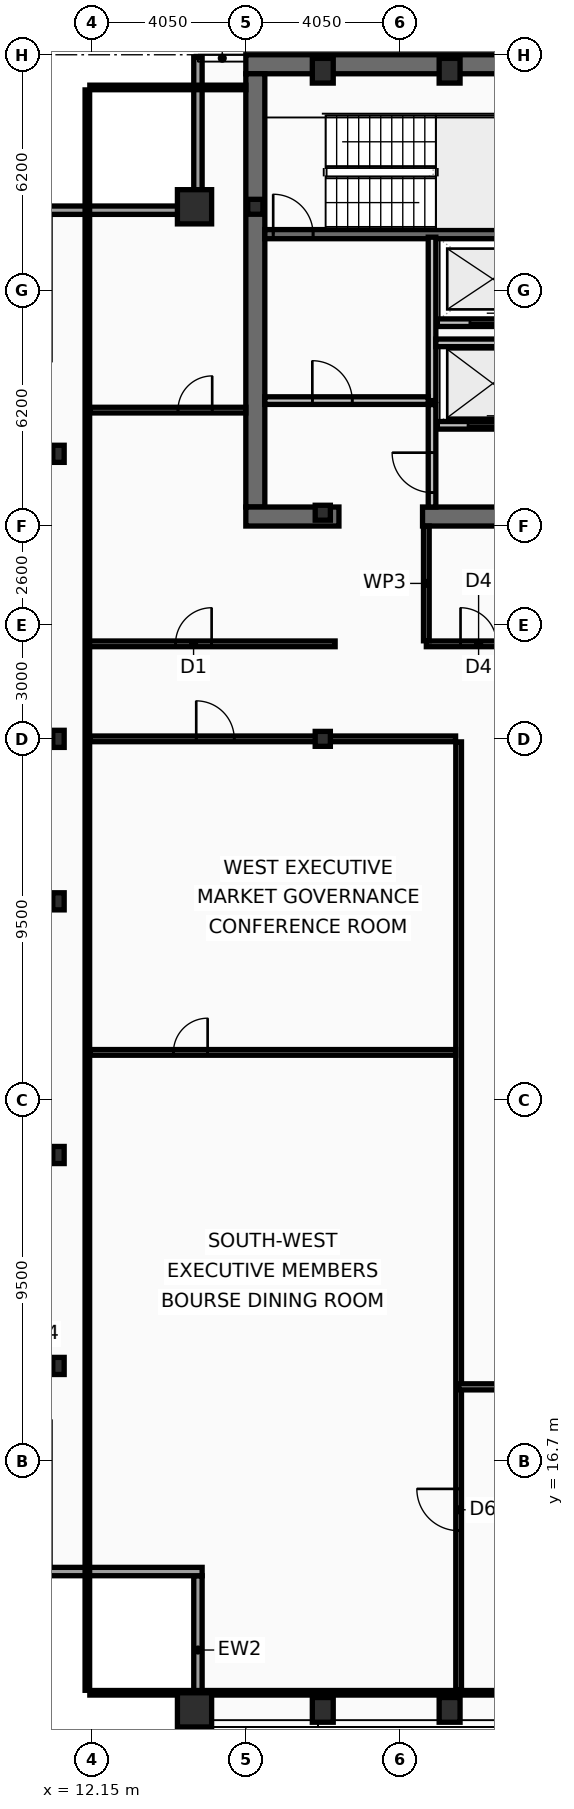
"""IFC4 building model, lengths in metres.
Left out: names, types, materials, properties, quantities, classifications, styles, units other than length and angle.
Written with IfcOpenShell. Run it as: python <this file> out.ifc"""

import sys

from ifc_helpers import new_model, si_unit, direction, frame, frame_2d, origin, origin_2d, place, context, subcontext, project, spatial, rectangle, hollow_rectangle, i_section, extrude, element, fill, save


model = new_model("IFC4")
c1 = context("Model", 3, precision=1e-05, world=origin(), true_north=direction((0.0, 1.0)))
c2 = subcontext(c1, "Body", "Model", "MODEL_VIEW")
j1 = project(units=[si_unit("LENGTHUNIT", "METRE"), si_unit("PLANEANGLEUNIT", "RADIAN")], contexts=[c1])
p1 = place(None, origin())
s1 = spatial("IfcSite", under=j1, at=p1, CompositionType="ELEMENT")
p2 = place(p1, origin())
s2 = spatial("IfcBuilding", under=s1, at=p2, CompositionType="ELEMENT")
p3 = place(p2, frame((0.0, 0.0, 298.6)))
s3 = spatial("IfcBuildingStorey", under=s2, at=p3, CompositionType="ELEMENT", Elevation=298.6)
p4 = place(p3, frame((16.2, 53.45, 0.0), z_axis=(0.0, 0.0, 1.0), x_axis=(1.0, 0.0, 0.0)))
e1 = element("IfcWall", 1, at=p4, inside=s3, PredefinedType="SHEAR", context=c2, shape_type="SweptSolid", body=[
    extrude(rectangle(XDim=40.5, YDim=0.5, at=frame_2d((20.25, 0.0))), origin(), (0.0, 0.0, 1.0), 3.44),
])
p5 = place(p3, frame((16.45, 41.8, 0.0), z_axis=(0.0, 0.0, 1.0), x_axis=(0.0, 1.0, 0.0)))
e2 = element("IfcWall", 2, at=p5, inside=s3, PredefinedType="SHEAR", context=c2, shape_type="SweptSolid", body=[
    extrude(rectangle(XDim=11.4, YDim=0.5, at=frame_2d((5.7, 0.0))), origin(), (0.0, 0.0, 1.0), 3.44),
])
p6 = place(p3, frame((18.65, 41.55, 0.0), z_axis=(0.0, 0.0, 1.0), x_axis=(-1.0, 0.0, 0.0)))
e3 = element("IfcWall", 3, at=p6, inside=s3, PredefinedType="SHEAR", context=c2, shape_type="SweptSolid", body=[
    extrude(rectangle(XDim=2.45, YDim=0.5, at=frame_2d((1.225, 0.0))), origin(), (0.0, 0.0, 1.0), 3.44),
])
p7 = place(p3, frame((32.3, 41.55, 0.0), z_axis=(0.0, 0.0, 1.0), x_axis=(-1.0, 0.0, 0.0)))
e4 = element("IfcWall", 4, at=p7, inside=s3, PredefinedType="SHEAR", context=c2, shape_type="SweptSolid", body=[
    extrude(rectangle(XDim=11.45, YDim=0.5, at=frame_2d((5.725, 0.0))), origin(), (0.0, 0.0, 1.0), 3.44),
])
p8 = place(p3, frame((16.7, 48.98, 0.0), z_axis=(0.0, 0.0, 1.0), x_axis=(1.0, 0.0, 0.0)))
e5 = element("IfcWall", 5, at=p8, inside=s3, PredefinedType="SHEAR", context=c2, shape_type="SweptSolid", body=[
    extrude(rectangle(XDim=7.52, YDim=0.24, at=frame_2d((3.76, 0.0))), origin(), (0.0, 0.0, 1.0), 3.44),
])
p9 = place(p8, frame((0.22, 0.0, 0.0)))
e6 = element("IfcOpeningElement", 6, at=p9, cuts=e5, PredefinedType="OPENING", context=c2, shape_type="SweptSolid", body=[
    extrude(rectangle(XDim=1.05, YDim=2.15, at=frame_2d((0.525, 1.075))), frame((0.0, 0.13, 0.0), z_axis=(0.0, -1.0, 0.0), x_axis=(1.0, 0.0, 0.0)), (0.0, 0.0, 1.0), 0.26),
])
for number, where, z_axis, x_axis in (
    (7, (14.85, 10.15, 0.0), (0.0, 0.0, 1.0), (1.0, 0.0, 0.0)),
    (8, (14.85, 49.7, 0.0), (0.0, 0.0, 1.0), (1.0, 0.0, 0.0)),
):
    element("IfcColumn", number, at=place(p3, frame(where, z_axis=z_axis, x_axis=x_axis)), inside=s3, PredefinedType="COLUMN", context=c2, shape_type="SweptSolid", body=[
        extrude(hollow_rectangle(XDim=0.9, YDim=0.9, WallThickness=0.05, at=origin_2d()), origin(), (0.0, 0.0, 1.0), 3.6),
    ])
for number, where, z_axis, x_axis in (
    (9, (18.225, 10.15, 0.0), (0.0, 0.0, 1.0), (1.0, 0.0, 0.0)),
    (10, (21.562, 10.15, 0.0), (0.0, 0.0, 1.0), (1.0, 0.0, 0.0)),
    (11, (18.225, 53.28, 0.0), (0.0, 0.0, 1.0), (1.0, 0.0, 0.0)),
    (12, (21.562, 53.28, 0.0), (0.0, 0.0, 1.0), (1.0, 0.0, 0.0)),
):
    element("IfcColumn", number, at=place(p3, frame(where, z_axis=z_axis, x_axis=x_axis)), inside=s3, PredefinedType="COLUMN", context=c2, shape_type="SweptSolid", body=[
        extrude(hollow_rectangle(XDim=0.55, YDim=0.65, WallThickness=0.04, at=origin_2d()), origin(), (0.0, 0.0, 1.0), 3.6),
    ])
for number, where, z_axis, x_axis in (
    (13, (11.27, 19.2, 0.0), (0.0, 0.0, 1.0), (1.0, 0.0, 0.0)),
    (14, (11.27, 24.75, 0.0), (0.0, 0.0, 1.0), (1.0, 0.0, 0.0)),
    (15, (11.27, 31.425, 0.0), (0.0, 0.0, 1.0), (1.0, 0.0, 0.0)),
    (16, (11.27, 35.7, 0.0), (0.0, 0.0, 1.0), (1.0, 0.0, 0.0)),
    (17, (11.27, 43.2, 0.0), (0.0, 0.0, 1.0), (1.0, 0.0, 0.0)),
):
    element("IfcColumn", number, at=place(p3, frame(where, z_axis=z_axis, x_axis=x_axis)), inside=s3, PredefinedType="COLUMN", context=c2, shape_type="SweptSolid", body=[
        extrude(i_section(OverallWidth=0.3, OverallDepth=0.45, WebThickness=0.014, FlangeThickness=0.026, at=origin_2d()), origin(), (0.0, 0.0, 1.0), 3.6),
    ])
for number, where, z_axis, x_axis in (
    (18, (16.45, 49.7, 0.0), (0.0, 0.0, 1.0), (1.0, 0.0, 0.0)),
    (19, (18.225, 35.7, 0.0), (0.0, 0.0, 1.0), (1.0, 0.0, 0.0)),
    (20, (18.225, 41.65, 0.0), (0.0, 0.0, 1.0), (1.0, 0.0, 0.0)),
):
    element("IfcColumn", number, at=place(p3, frame(where, z_axis=z_axis, x_axis=x_axis)), inside=s3, PredefinedType="COLUMN", context=c2, shape_type="SweptSolid", body=[
        extrude(i_section(OverallWidth=0.399, OverallDepth=0.393, WebThickness=0.023, FlangeThickness=0.037, at=origin_2d()), origin(), (0.0, 0.0, 1.0), 3.6),
    ])
p10 = place(p3, frame((14.94, 9.77, 0.0), z_axis=(0.0, 0.0, 1.0), x_axis=(0.0, 1.0, 0.0)))
e21 = element("IfcWall", 21, at=p10, inside=s3, PredefinedType="SOLIDWALL", context=c2, shape_type="SweptSolid", body=[
    extrude(rectangle(XDim=3.91, YDim=0.22, at=frame_2d((1.955, 0.0))), origin(), (0.0, 0.0, 1.0), 2.88),
])
for number, where, z_axis, x_axis in (
    (22, (15.05, 13.79, 0.0), (0.0, 0.0, 1.0), (-1.0, 0.0, 0.0)),
    (23, (10.83, 49.61, 0.0), (0.0, 0.0, 1.0), (1.0, 0.0, 0.0)),
):
    element("IfcWall", number, at=place(p3, frame(where, z_axis=z_axis, x_axis=x_axis)), inside=s3, PredefinedType="SOLIDWALL", context=c2, shape_type="SweptSolid", body=[
        extrude(rectangle(XDim=4.22, YDim=0.22, at=frame_2d((2.11, 0.0))), origin(), (0.0, 0.0, 1.0), 2.88),
    ])
p11 = place(p3, frame((14.94, 49.72, 0.0), z_axis=(0.0, 0.0, 1.0), x_axis=(0.0, 1.0, 0.0)))
e24 = element("IfcWall", 24, at=p11, inside=s3, PredefinedType="SOLIDWALL", context=c2, shape_type="SweptSolid", body=[
    extrude(rectangle(XDim=3.91, YDim=0.22, at=frame_2d((1.955, 0.0))), origin(), (0.0, 0.0, 1.0), 2.88),
])
p12 = place(p3, frame((24.21, 43.95, 0.0), z_axis=(0.0, 0.0, 1.0), x_axis=(-1.0, 0.0, 0.0)))
e25 = element("IfcWall", 25, at=p12, inside=s3, PredefinedType="PARTITIONING", context=c2, shape_type="SweptSolid", body=[
    extrude(rectangle(XDim=2.97, YDim=0.2, at=frame_2d((1.485, 0.0))), origin(), (0.0, 0.0, 1.0), 3.44),
])
p13 = place(p12, frame((0.86, 0.0, 0.0)))
e26 = element("IfcOpeningElement", 26, at=p13, cuts=e25, PredefinedType="OPENING", context=c2, shape_type="SweptSolid", body=[
    extrude(rectangle(XDim=1.3, YDim=2.18, at=frame_2d((0.65, 1.09))), frame((0.0, 0.11, 0.0), z_axis=(0.0, -1.0, 0.0), x_axis=(1.0, 0.0, 0.0)), (0.0, 0.0, 1.0), 0.22),
])
p14 = place(p3, frame((24.21, 46.65, 0.0), z_axis=(0.0, 0.0, 1.0), x_axis=(-1.0, 0.0, 0.0)))
e27 = element("IfcWall", 27, at=p14, inside=s3, PredefinedType="PARTITIONING", context=c2, shape_type="SweptSolid", body=[
    extrude(rectangle(XDim=2.97, YDim=0.2, at=frame_2d((1.485, 0.0))), origin(), (0.0, 0.0, 1.0), 3.44),
])
p15 = place(p14, frame((0.91, 0.0, 0.0)))
e28 = element("IfcOpeningElement", 28, at=p15, cuts=e27, PredefinedType="OPENING", context=c2, shape_type="SweptSolid", body=[
    extrude(rectangle(XDim=1.2, YDim=2.18, at=frame_2d((0.6, 1.09))), frame((0.0, 0.11, 0.0), z_axis=(0.0, -1.0, 0.0), x_axis=(1.0, 0.0, 0.0)), (0.0, 0.0, 1.0), 0.22),
])
p16 = place(p3, frame((21.1, 44.6, 0.0), z_axis=(0.0, 0.0, 1.0), x_axis=(0.0, 1.0, 0.0)))
e29 = element("IfcWall", 29, at=p16, inside=s3, PredefinedType="PARTITIONING", context=c2, shape_type="SweptSolid", body=[
    extrude(rectangle(XDim=4.3, YDim=0.2, at=frame_2d((2.15, 0.0))), origin(), (0.0, 0.0, 1.0), 3.44),
])
p17 = place(p3, frame((16.7, 44.6, 0.0), z_axis=(0.0, 0.0, 1.0), x_axis=(1.0, 0.0, 0.0)))
e30 = element("IfcWall", 30, at=p17, inside=s3, PredefinedType="PARTITIONING", context=c2, shape_type="SweptSolid", body=[
    extrude(rectangle(XDim=4.3, YDim=0.2, at=frame_2d((2.15, 0.0))), origin(), (0.0, 0.0, 1.0), 3.44),
])
p18 = place(p17, frame((1.25, 0.0, 0.0)))
e31 = element("IfcOpeningElement", 31, at=p18, cuts=e30, PredefinedType="OPENING", context=c2, shape_type="SweptSolid", body=[
    extrude(rectangle(XDim=1.05, YDim=2.15, at=frame_2d((0.525, 1.075))), frame((0.0, 0.11, 0.0), z_axis=(0.0, -1.0, 0.0), x_axis=(1.0, 0.0, 0.0)), (0.0, 0.0, 1.0), 0.22),
])
p19 = place(p3, frame((21.2, 46.12, 0.0), z_axis=(0.0, 0.0, 1.0), x_axis=(1.0, 0.0, 0.0)))
e32 = element("IfcWall", 32, at=p19, inside=s3, PredefinedType="PARTITIONING", context=c2, shape_type="SweptSolid", body=[
    extrude(rectangle(XDim=3.02, YDim=0.2, at=frame_2d((1.51, 0.0))), origin(), (0.0, 0.0, 1.0), 3.44),
])
p20 = place(p3, frame((21.1, 41.8, 0.0), z_axis=(0.0, 0.0, 1.0), x_axis=(0.0, 1.0, 0.0)))
e33 = element("IfcWall", 33, at=p20, inside=s3, PredefinedType="PARTITIONING", context=c2, shape_type="SweptSolid", body=[
    extrude(rectangle(XDim=2.695, YDim=0.2, at=frame_2d((1.348, 0.0))), origin(), (0.0, 0.0, 1.0), 3.44),
])
p21 = place(p20, frame((0.38, 0.0, 0.0)))
e34 = element("IfcOpeningElement", 34, at=p21, cuts=e33, PredefinedType="OPENING", context=c2, shape_type="SweptSolid", body=[
    extrude(rectangle(XDim=1.05, YDim=2.15, at=frame_2d((0.525, 1.075))), frame((0.0, 0.11, 0.0), z_axis=(0.0, -1.0, 0.0), x_axis=(1.0, 0.0, 0.0)), (0.0, 0.0, 1.0), 0.22),
])
p22 = place(p3, frame((20.95, 38.2, 0.0), z_axis=(0.0, 0.0, 1.0), x_axis=(1.0, 0.0, 0.0)))
e35 = element("IfcWall", 35, at=p22, inside=s3, PredefinedType="PARTITIONING", context=c2, shape_type="SweptSolid", body=[
    extrude(rectangle(XDim=3.75, YDim=0.15, at=frame_2d((1.875, 0.0))), origin(), (0.0, 0.0, 1.0), 2.78),
])
p23 = place(p22, frame((0.9, 0.0, 0.0)))
e36 = element("IfcOpeningElement", 36, at=p23, cuts=e35, PredefinedType="OPENING", context=c2, shape_type="SweptSolid", body=[
    extrude(rectangle(XDim=0.95, YDim=2.05, at=frame_2d((0.475, 1.025))), frame((0.0, 0.085, 0.0), z_axis=(0.0, -1.0, 0.0), x_axis=(1.0, 0.0, 0.0)), (0.0, 0.0, 1.0), 0.17),
])
p24 = place(p3, frame((20.95, 38.28, 0.0), z_axis=(0.0, 0.0, 1.0), x_axis=(0.0, 1.0, 0.0)))
e37 = element("IfcWall", 37, at=p24, inside=s3, PredefinedType="PARTITIONING", context=c2, shape_type="SweptSolid", body=[
    extrude(rectangle(XDim=3.02, YDim=0.15, at=frame_2d((1.51, 0.0))), origin(), (0.0, 0.0, 1.0), 3.44),
])
p25 = place(p3, frame((12.03, 38.2, 0.0), z_axis=(0.0, 0.0, 1.0), x_axis=(1.0, 0.0, 0.0)))
e38 = element("IfcWall", 38, at=p25, inside=s3, PredefinedType="PARTITIONING", context=c2, shape_type="SweptSolid", body=[
    extrude(rectangle(XDim=6.52, YDim=0.15, at=frame_2d((3.26, 0.0))), origin(), (0.0, 0.0, 1.0), 2.78),
])
p26 = place(p25, frame((2.32, 0.0, 0.0)))
e39 = element("IfcOpeningElement", 39, at=p26, cuts=e38, PredefinedType="OPENING", context=c2, shape_type="SweptSolid", body=[
    extrude(rectangle(XDim=0.95, YDim=2.05, at=frame_2d((0.475, 1.025))), frame((0.0, 0.085, 0.0), z_axis=(0.0, -1.0, 0.0), x_axis=(1.0, 0.0, 0.0)), (0.0, 0.0, 1.0), 0.17),
])
p27 = place(p3, frame((12.095, 44.35, 0.0), z_axis=(0.0, 0.0, 1.0), x_axis=(1.0, 0.0, 0.0)))
e40 = element("IfcWall", 40, at=p27, inside=s3, PredefinedType="PARTITIONING", context=c2, shape_type="SweptSolid", body=[
    extrude(rectangle(XDim=4.105, YDim=0.15, at=frame_2d((2.052, 0.0))), origin(), (0.0, 0.0, 1.0), 2.88),
])
p28 = place(p27, frame((2.32, 0.0, 0.0)))
e41 = element("IfcOpeningElement", 41, at=p28, cuts=e40, PredefinedType="OPENING", context=c2, shape_type="SweptSolid", body=[
    extrude(rectangle(XDim=0.9, YDim=2.05, at=frame_2d((0.45, 1.025))), frame((0.0, 0.085, 0.0), z_axis=(0.0, -1.0, 0.0), x_axis=(1.0, 0.0, 0.0)), (0.0, 0.0, 1.0), 0.17),
])
p29 = place(p3, frame((21.8, 10.665, 0.0), z_axis=(0.0, 0.0, 1.0), x_axis=(0.0, 1.0, 0.0)))
e42 = element("IfcWall", 42, at=p29, inside=s3, PredefinedType="PARTITIONING", context=c2, shape_type="SweptSolid", body=[
    extrude(rectangle(XDim=24.955, YDim=0.15, at=frame_2d((12.478, 0.0))), origin(), (0.0, 0.0, 1.0), 3.03),
])
p30 = place(p29, frame((4.2, 0.0, 0.0)))
e43 = element("IfcOpeningElement", 43, at=p30, cuts=e42, PredefinedType="OPENING", context=c2, shape_type="SweptSolid", body=[
    extrude(rectangle(XDim=1.1, YDim=2.1, at=frame_2d((0.55, 1.05))), frame((0.0, 0.085, 0.0), z_axis=(0.0, -1.0, 0.0), x_axis=(1.0, 0.0, 0.0)), (0.0, 0.0, 1.0), 0.17),
])
p31 = place(p3, frame((12.095, 35.7, 0.0), z_axis=(0.0, 0.0, 1.0), x_axis=(1.0, 0.0, 0.0)))
e44 = element("IfcWall", 44, at=p31, inside=s3, PredefinedType="PARTITIONING", context=c2, shape_type="SweptSolid", body=[
    extrude(rectangle(XDim=9.625, YDim=0.15, at=frame_2d((4.812, 0.0))), origin(), (0.0, 0.0, 1.0), 2.78),
])
p32 = place(p31, frame((2.8, 0.0, 0.0)))
e45 = element("IfcOpeningElement", 45, at=p32, cuts=e44, PredefinedType="OPENING", context=c2, shape_type="SweptSolid", body=[
    extrude(rectangle(XDim=1.0, YDim=2.05, at=frame_2d((0.5, 1.025))), frame((0.0, 0.085, 0.0), z_axis=(0.0, -1.0, 0.0), x_axis=(1.0, 0.0, 0.0)), (0.0, 0.0, 1.0), 0.17),
])
p33 = place(p3, frame((12.095, 27.45, 0.0), z_axis=(0.0, 0.0, 1.0), x_axis=(1.0, 0.0, 0.0)))
e46 = element("IfcWall", 46, at=p33, inside=s3, PredefinedType="PARTITIONING", context=c2, shape_type="SweptSolid", body=[
    extrude(rectangle(XDim=9.625, YDim=0.15, at=frame_2d((4.812, 0.0))), origin(), (0.0, 0.0, 1.0), 2.78),
])
p34 = place(p33, frame((2.2, 0.0, 0.0)))
e47 = element("IfcOpeningElement", 47, at=p34, cuts=e46, PredefinedType="OPENING", context=c2, shape_type="SweptSolid", body=[
    extrude(rectangle(XDim=0.9, YDim=2.05, at=frame_2d((0.45, 1.025))), frame((0.0, 0.085, 0.0), z_axis=(0.0, -1.0, 0.0), x_axis=(1.0, 0.0, 0.0)), (0.0, 0.0, 1.0), 0.17),
])
p35 = place(p3, frame((21.8, 18.65, 0.0), z_axis=(0.0, 0.0, 1.0), x_axis=(1.0, 0.0, 0.0)))
e48 = element("IfcWall", 48, at=p35, inside=s3, PredefinedType="PARTITIONING", context=c2, shape_type="SweptSolid", body=[
    extrude(rectangle(XDim=10.032, YDim=0.16, at=frame_2d((5.016, 0.0))), origin(), (0.0, 0.0, 1.0), 2.78),
])
p36 = place(p35, frame((4.213, 0.0, 0.0)))
e49 = element("IfcOpeningElement", 49, at=p36, cuts=e48, PredefinedType="OPENING", context=c2, shape_type="SweptSolid", body=[
    extrude(rectangle(XDim=1.0, YDim=2.05, at=frame_2d((0.5, 1.025))), frame((0.0, 0.09, 0.0), z_axis=(0.0, -1.0, 0.0), x_axis=(1.0, 0.0, 0.0)), (0.0, 0.0, 1.0), 0.18),
])
p37 = place(p3, frame((12.03, 10.665, 0.0), z_axis=(0.0, 0.0, 1.0), x_axis=(0.0, 1.0, 0.0)))
e50 = element("IfcWall", 50, at=p37, inside=s3, PredefinedType="PARTITIONING", context=c2, shape_type="SweptSolid", body=[
    extrude(rectangle(XDim=42.11, YDim=0.12, at=frame_2d((21.055, 0.0))), origin(), (0.0, 0.0, 1.0), 2.78),
])
p38 = place(p3, frame((12.095, 52.84, 0.0), z_axis=(0.0, 0.0, 1.0), x_axis=(1.0, 0.0, 0.0)))
e51 = element("IfcWall", 51, at=p38, inside=s3, PredefinedType="PARTITIONING", context=c2, shape_type="SweptSolid", body=[
    extrude(rectangle(XDim=4.105, YDim=0.12, at=frame_2d((2.052, 0.0))), origin(), (0.0, 0.0, 1.0), 3.44),
])
p39 = place(p3, frame((12.095, 10.6, 0.0), z_axis=(0.0, 0.0, 1.0), x_axis=(1.0, 0.0, 0.0)))
e52 = element("IfcWall", 52, at=p39, inside=s3, PredefinedType="PARTITIONING", context=c2, shape_type="SweptSolid", body=[
    extrude(rectangle(XDim=48.71, YDim=0.12, at=frame_2d((24.355, 0.0))), origin(), (0.0, 0.0, 1.0), 2.78),
])
p40 = place(p9, origin())
e53 = element("IfcDoor", 53, at=p40, inside=s3, OperationType="SINGLE_SWING_LEFT", PredefinedType="DOOR", context=c2, shape_type="SweptSolid", body=[
    extrude(rectangle(XDim=1.05, YDim=2.15, at=frame_2d((0.525, 1.075))), frame((0.0, 0.025, 0.0), z_axis=(0.0, -1.0, 0.0), x_axis=(1.0, 0.0, 0.0)), (0.0, 0.0, 1.0), 0.05),
])
fill(e6, e53)
p41 = place(p13, origin())
e54 = element("IfcDoor", 54, at=p41, inside=s3, OperationType="SLIDING_TO_LEFT", PredefinedType="DOOR", context=c2, shape_type="SweptSolid", body=[
    extrude(rectangle(XDim=1.3, YDim=2.18, at=frame_2d((0.65, 1.09))), frame((0.0, 0.025, 0.0), z_axis=(0.0, -1.0, 0.0), x_axis=(1.0, 0.0, 0.0)), (0.0, 0.0, 1.0), 0.05),
])
fill(e26, e54)
p42 = place(p15, origin())
e55 = element("IfcDoor", 55, at=p42, inside=s3, OperationType="SLIDING_TO_LEFT", PredefinedType="DOOR", context=c2, shape_type="SweptSolid", body=[
    extrude(rectangle(XDim=1.2, YDim=2.18, at=frame_2d((0.6, 1.09))), frame((0.0, 0.025, 0.0), z_axis=(0.0, -1.0, 0.0), x_axis=(1.0, 0.0, 0.0)), (0.0, 0.0, 1.0), 0.05),
])
fill(e28, e55)
p43 = place(p18, origin())
e56 = element("IfcDoor", 56, at=p43, inside=s3, OperationType="SINGLE_SWING_LEFT", PredefinedType="DOOR", context=c2, shape_type="SweptSolid", body=[
    extrude(rectangle(XDim=1.05, YDim=2.15, at=frame_2d((0.525, 1.075))), frame((0.0, 0.025, 0.0), z_axis=(0.0, -1.0, 0.0), x_axis=(1.0, 0.0, 0.0)), (0.0, 0.0, 1.0), 0.05),
])
fill(e31, e56)
p44 = place(p21, origin())
e57 = element("IfcDoor", 57, at=p44, inside=s3, OperationType="SINGLE_SWING_RIGHT", PredefinedType="DOOR", context=c2, shape_type="SweptSolid", body=[
    extrude(rectangle(XDim=1.05, YDim=2.15, at=frame_2d((0.525, 1.075))), frame((0.0, 0.025, 0.0), z_axis=(0.0, -1.0, 0.0), x_axis=(1.0, 0.0, 0.0)), (0.0, 0.0, 1.0), 0.05),
])
fill(e34, e57)
p45 = place(p23, origin())
e58 = element("IfcDoor", 58, at=p45, inside=s3, OperationType="SINGLE_SWING_LEFT", PredefinedType="DOOR", context=c2, shape_type="SweptSolid", body=[
    extrude(rectangle(XDim=0.95, YDim=2.05, at=frame_2d((0.475, 1.025))), frame((0.0, 0.025, 0.0), z_axis=(0.0, -1.0, 0.0), x_axis=(1.0, 0.0, 0.0)), (0.0, 0.0, 1.0), 0.05),
])
fill(e36, e58)
p46 = place(p26, origin())
e59 = element("IfcDoor", 59, at=p46, inside=s3, OperationType="SINGLE_SWING_RIGHT", PredefinedType="DOOR", context=c2, shape_type="SweptSolid", body=[
    extrude(rectangle(XDim=0.95, YDim=2.05, at=frame_2d((0.475, 1.025))), frame((0.0, 0.025, 0.0), z_axis=(0.0, -1.0, 0.0), x_axis=(1.0, 0.0, 0.0)), (0.0, 0.0, 1.0), 0.05),
])
fill(e39, e59)
p47 = place(p28, origin())
e60 = element("IfcDoor", 60, at=p47, inside=s3, OperationType="SINGLE_SWING_RIGHT", PredefinedType="DOOR", context=c2, shape_type="SweptSolid", body=[
    extrude(rectangle(XDim=0.9, YDim=2.05, at=frame_2d((0.45, 1.025))), frame((0.0, 0.025, 0.0), z_axis=(0.0, -1.0, 0.0), x_axis=(1.0, 0.0, 0.0)), (0.0, 0.0, 1.0), 0.05),
])
fill(e41, e60)
p48 = place(p30, origin())
e61 = element("IfcDoor", 61, at=p48, inside=s3, OperationType="SINGLE_SWING_RIGHT", PredefinedType="DOOR", context=c2, shape_type="SweptSolid", body=[
    extrude(rectangle(XDim=1.1, YDim=2.1, at=frame_2d((0.55, 1.05))), frame((0.0, 0.025, 0.0), z_axis=(0.0, -1.0, 0.0), x_axis=(1.0, 0.0, 0.0)), (0.0, 0.0, 1.0), 0.05),
])
fill(e43, e61)
p49 = place(p32, origin())
e62 = element("IfcDoor", 62, at=p49, inside=s3, OperationType="SINGLE_SWING_LEFT", PredefinedType="DOOR", context=c2, shape_type="SweptSolid", body=[
    extrude(rectangle(XDim=1.0, YDim=2.05, at=frame_2d((0.5, 1.025))), frame((0.0, 0.025, 0.0), z_axis=(0.0, -1.0, 0.0), x_axis=(1.0, 0.0, 0.0)), (0.0, 0.0, 1.0), 0.05),
])
fill(e45, e62)
p50 = place(p34, origin())
e63 = element("IfcDoor", 63, at=p50, inside=s3, OperationType="SINGLE_SWING_RIGHT", PredefinedType="DOOR", context=c2, shape_type="SweptSolid", body=[
    extrude(rectangle(XDim=0.9, YDim=2.05, at=frame_2d((0.45, 1.025))), frame((0.0, 0.025, 0.0), z_axis=(0.0, -1.0, 0.0), x_axis=(1.0, 0.0, 0.0)), (0.0, 0.0, 1.0), 0.05),
])
fill(e47, e63)
save(model, sys.argv[1])
